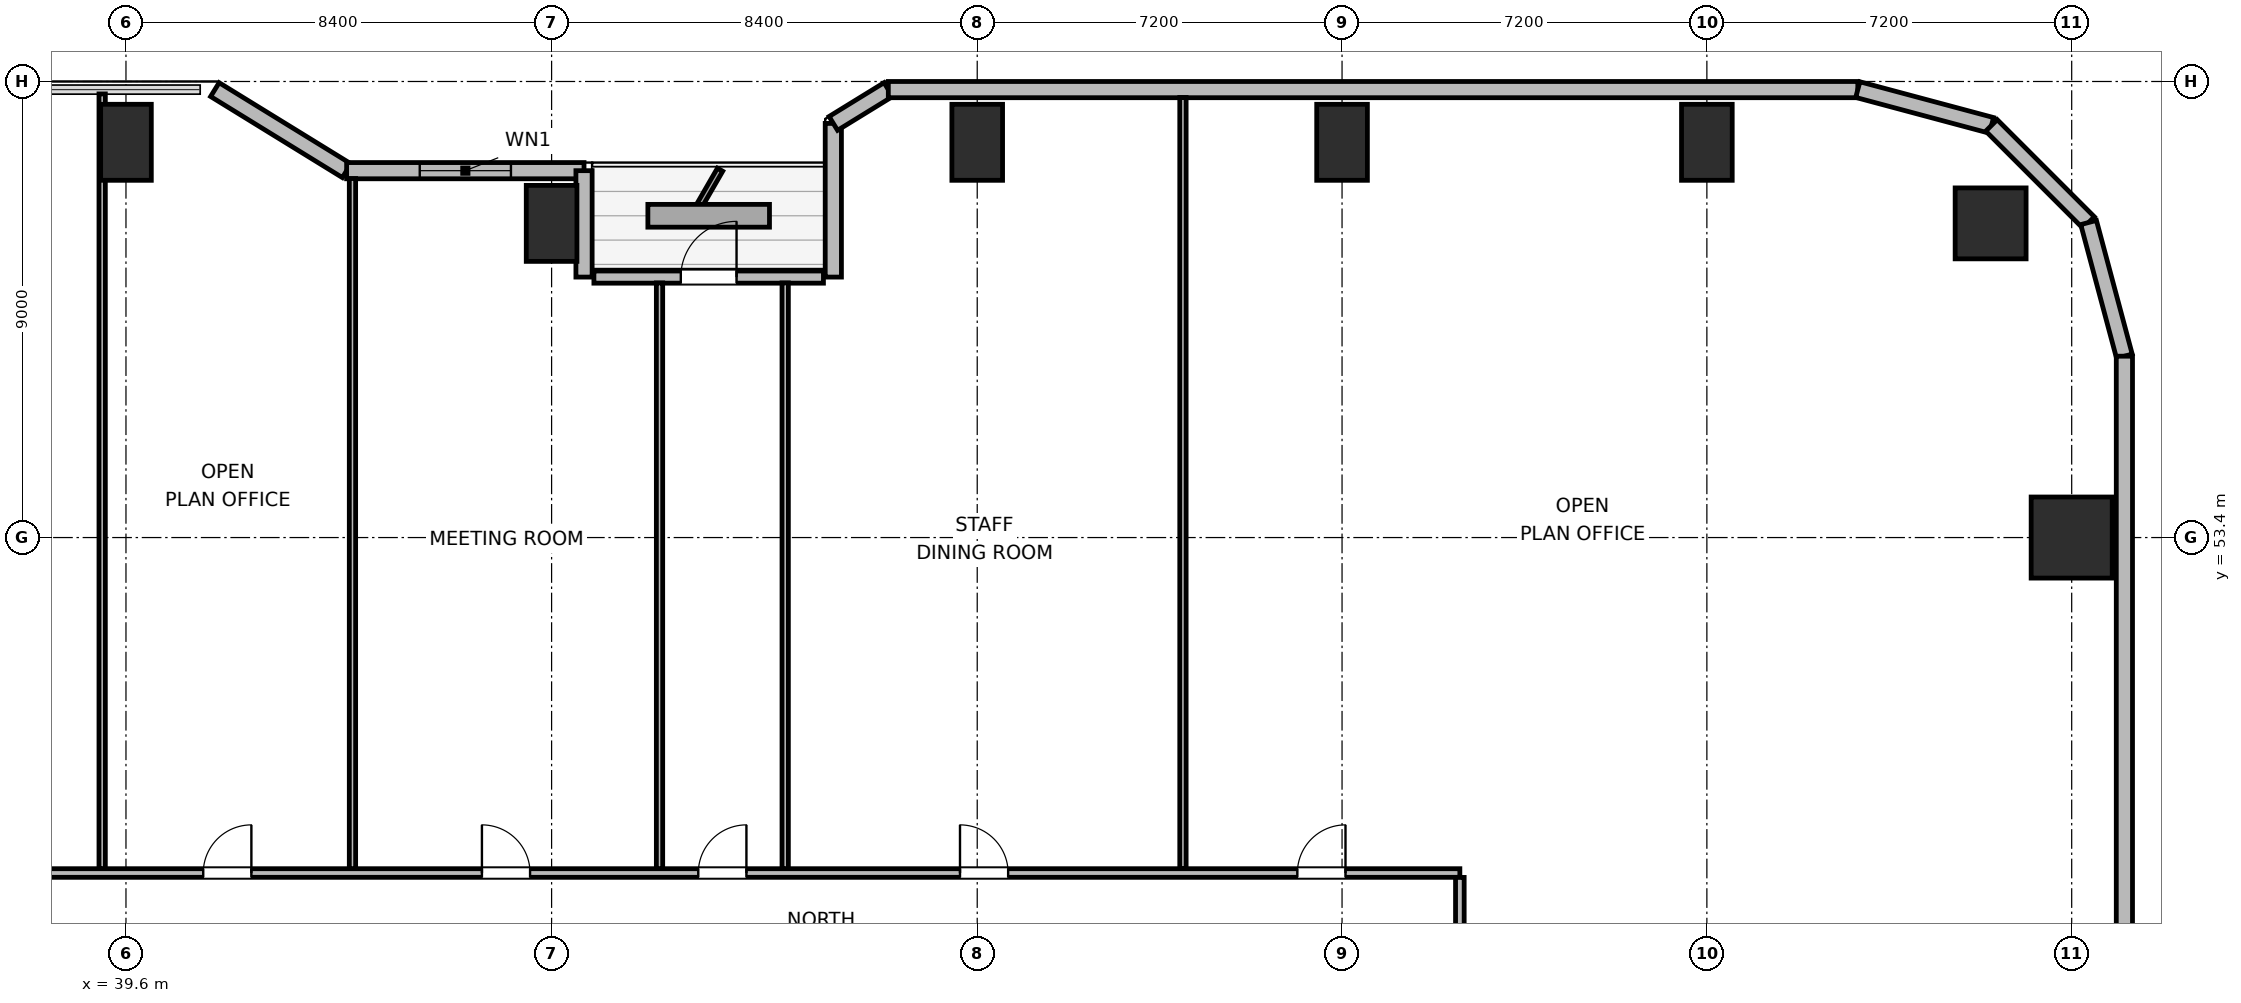
"""IFC4 building model, lengths in metres.
Left out: names, types, materials, properties, quantities, classifications, styles, units other than length and angle.
Written with IfcOpenShell. Run it as: python <this file> out.ifc"""

import sys

from ifc_helpers import new_model, si_unit, direction, frame, frame_2d, origin, origin_2d, place, context, subcontext, project, spatial, rectangle, circle, extrude, element, fill, save


model = new_model("IFC4")
c1 = context("Model", 3, precision=1e-05, world=origin(), true_north=direction((0.0, 1.0)))
c2 = subcontext(c1, "Body", "Model", "MODEL_VIEW")
j1 = project(units=[si_unit("LENGTHUNIT", "METRE"), si_unit("PLANEANGLEUNIT", "RADIAN")], contexts=[c1])
p1 = place(None, origin())
s1 = spatial("IfcSite", under=j1, at=p1, CompositionType="ELEMENT")
p2 = place(p1, origin())
s2 = spatial("IfcBuilding", under=s1, at=p2, CompositionType="ELEMENT")
p3 = place(p2, frame((0.0, 0.0, 41.1)))
s3 = spatial("IfcBuildingStorey", under=s2, at=p3, CompositionType="ELEMENT", Elevation=41.1)
p4 = place(p3, frame((76.4, 59.6, 0.0), z_axis=(0.0, 0.0, 1.0), x_axis=(1.0, 0.0, 0.0)))
e1 = element("IfcColumn", 1, at=p4, inside=s3, PredefinedType="COLUMN", context=c2, shape_type="SweptSolid", body=[
    extrude(circle(Radius=0.7, at=origin_2d()), origin(), (0.0, 0.0, 1.0), 3.9),
])
for number, where, z_axis, x_axis in (
    (2, (39.6, 61.2, 0.0), (0.0, 0.0, 1.0), (1.0, 0.0, 0.0)),
    (3, (48.0, 59.6, 0.0), (0.0, 0.0, 1.0), (1.0, 0.0, 0.0)),
    (4, (56.4, 61.2, 0.0), (0.0, 0.0, 1.0), (1.0, 0.0, 0.0)),
    (5, (63.6, 61.2, 0.0), (0.0, 0.0, 1.0), (1.0, 0.0, 0.0)),
    (6, (70.8, 61.2, 0.0), (0.0, 0.0, 1.0), (1.0, 0.0, 0.0)),
):
    element("IfcColumn", number, at=place(p3, frame(where, z_axis=z_axis, x_axis=x_axis)), inside=s3, PredefinedType="COLUMN", context=c2, shape_type="SweptSolid", body=[
        extrude(rectangle(XDim=1.0, YDim=1.5, at=origin_2d()), origin(), (0.0, 0.0, 1.0), 3.9),
    ])
p5 = place(p3, frame((78.0, 53.4, 0.0), z_axis=(0.0, 0.0, 1.0), x_axis=(1.0, 0.0, 0.0)))
e7 = element("IfcColumn", 7, at=p5, inside=s3, PredefinedType="COLUMN", context=c2, shape_type="SweptSolid", body=[
    extrude(rectangle(XDim=1.6, YDim=1.6, at=origin_2d()), origin(), (0.0, 0.0, 1.0), 3.9),
])
p6 = place(p3, frame((41.355, 62.24, 0.0), z_axis=(0.0, 0.0, 1.0), x_axis=(0.851630857047, -0.524142044989, 0.0)))
e8 = element("IfcWall", 8, at=p6, inside=s3, PredefinedType="SOLIDWALL", context=c2, shape_type="SweptSolid", body=[
    extrude(rectangle(XDim=3.053, YDim=0.32, at=frame_2d((1.526, 0.0))), origin(), (0.0, 0.0, 1.0), 2.875),
])
p7 = place(p3, frame((43.955, 60.64, 0.0), z_axis=(0.0, 0.0, 1.0), x_axis=(1.0, 0.0, 0.0)))
e9 = element("IfcWall", 9, at=p7, inside=s3, PredefinedType="SOLIDWALL", context=c2, shape_type="SweptSolid", body=[
    extrude(rectangle(XDim=4.685, YDim=0.32, at=frame_2d((2.343, 0.0))), origin(), (0.0, 0.0, 1.0), 2.875),
])
p8 = place(p7, frame((1.443, 0.0, 0.85)))
e10 = element("IfcOpeningElement", 10, at=p8, cuts=e9, PredefinedType="OPENING", context=c2, shape_type="SweptSolid", body=[
    extrude(rectangle(XDim=1.8, YDim=1.1, at=frame_2d((0.9, 0.55))), frame((0.0, 0.17, 0.0), z_axis=(0.0, -1.0, 0.0), x_axis=(1.0, 0.0, 0.0)), (0.0, 0.0, 1.0), 0.34),
])
p9 = place(p3, frame((48.64, 60.64, 0.0), z_axis=(0.0, 0.0, 1.0), x_axis=(0.0, -1.0, 0.0)))
e11 = element("IfcWall", 11, at=p9, inside=s3, PredefinedType="SOLIDWALL", context=c2, shape_type="SweptSolid", body=[
    extrude(rectangle(XDim=2.1, YDim=0.32, at=frame_2d((1.05, 0.0))), origin(), (0.0, 0.0, 1.0), 2.875),
])
p10 = place(p3, frame((48.835, 58.54, 0.0), z_axis=(0.0, 0.0, 1.0), x_axis=(1.0, 0.0, 0.0)))
e12 = element("IfcWall", 12, at=p10, inside=s3, PredefinedType="SOLIDWALL", context=c2, shape_type="SweptSolid", body=[
    extrude(rectangle(XDim=4.53, YDim=0.24, at=frame_2d((2.265, 0.0))), origin(), (0.0, 0.0, 1.0), 3.64),
])
p11 = place(p10, frame((1.715, 0.0, 0.0)))
e13 = element("IfcOpeningElement", 13, at=p11, cuts=e12, PredefinedType="OPENING", context=c2, shape_type="SweptSolid", body=[
    extrude(rectangle(XDim=1.1, YDim=2.04, at=frame_2d((0.55, 1.02))), frame((0.0, 0.13, 0.0), z_axis=(0.0, -1.0, 0.0), x_axis=(1.0, 0.0, 0.0)), (0.0, 0.0, 1.0), 0.26),
])
p12 = place(p3, frame((53.56, 58.54, 0.0), z_axis=(0.0, 0.0, 1.0), x_axis=(0.0, 1.0, 0.0)))
e14 = element("IfcWall", 14, at=p12, inside=s3, PredefinedType="SOLIDWALL", context=c2, shape_type="SweptSolid", body=[
    extrude(rectangle(XDim=3.032, YDim=0.32, at=frame_2d((1.516, 0.0))), origin(), (0.0, 0.0, 1.0), 2.875),
])
p13 = place(p3, frame((53.56, 61.573, 0.0), z_axis=(0.0, 0.0, 1.0), x_axis=(0.851776724646, 0.523904964045, 0.0)))
e15 = element("IfcWall", 15, at=p13, inside=s3, PredefinedType="SOLIDWALL", context=c2, shape_type="SweptSolid", body=[
    extrude(rectangle(XDim=1.274, YDim=0.32, at=frame_2d((0.637, 0.0))), origin(), (0.0, 0.0, 1.0), 3.64),
])
p14 = place(p3, frame((54.645, 62.24, 0.0), z_axis=(0.0, 0.0, 1.0), x_axis=(1.0, 0.0, 0.0)))
e16 = element("IfcWall", 16, at=p14, inside=s3, PredefinedType="SOLIDWALL", context=c2, shape_type="SweptSolid", body=[
    extrude(rectangle(XDim=19.134, YDim=0.32, at=frame_2d((9.567, 0.0))), origin(), (0.0, 0.0, 1.0), 3.64),
])
p15 = place(p3, frame((73.779, 62.24, 0.0), z_axis=(0.0, 0.0, 1.0), x_axis=(0.965964405026, -0.25867502435, 0.0)))
e17 = element("IfcWall", 17, at=p15, inside=s3, PredefinedType="SOLIDWALL", context=c2, shape_type="SweptSolid", body=[
    extrude(rectangle(XDim=2.731, YDim=0.32, at=frame_2d((1.366, 0.0))), origin(), (0.0, 0.0, 1.0), 3.64),
])
p16 = place(p3, frame((76.417, 61.533, 0.0), z_axis=(0.0, 0.0, 1.0), x_axis=(0.707106781187, -0.707106781187, 0.0)))
e18 = element("IfcWall", 18, at=p16, inside=s3, PredefinedType="SOLIDWALL", context=c2, shape_type="SweptSolid", body=[
    extrude(rectangle(XDim=2.71, YDim=0.32, at=frame_2d((1.355, 0.0))), origin(), (0.0, 0.0, 1.0), 3.64),
])
p17 = place(p3, frame((78.333, 59.617, 0.0), z_axis=(0.0, 0.0, 1.0), x_axis=(0.25869736047, -0.965958423373, 0.0)))
e19 = element("IfcWall", 19, at=p17, inside=s3, PredefinedType="SOLIDWALL", context=c2, shape_type="SweptSolid", body=[
    extrude(rectangle(XDim=2.731, YDim=0.32, at=frame_2d((1.366, 0.0))), origin(), (0.0, 0.0, 1.0), 3.64),
])
p18 = place(p3, frame((79.04, 56.979, 0.0), z_axis=(0.0, 0.0, 1.0), x_axis=(0.0, -1.0, 0.0)))
e20 = element("IfcWall", 20, at=p18, inside=s3, PredefinedType="SOLIDWALL", context=c2, shape_type="SweptSolid", body=[
    extrude(rectangle(XDim=14.219, YDim=0.32, at=frame_2d((7.109, 0.0))), origin(), (0.0, 0.0, 1.0), 3.64),
])
p19 = place(p3, frame((30.075, 46.78, 0.0), z_axis=(0.0, 0.0, 1.0), x_axis=(1.0, 0.0, 0.0)))
e21 = element("IfcWall", 21, at=p19, inside=s3, PredefinedType="PARTITIONING", context=c2, shape_type="SweptSolid", body=[
    extrude(rectangle(XDim=35.85, YDim=0.17, at=frame_2d((17.925, 0.0))), origin(), (0.0, 0.0, 1.0), 3.64),
])
p20 = place(p19, frame((4.053, 0.0, 0.0)))
e22 = element("IfcOpeningElement", 22, at=p20, cuts=e21, PredefinedType="OPENING", context=c2, shape_type="SweptSolid", body=[
    extrude(rectangle(XDim=0.95, YDim=2.04, at=frame_2d((0.475, 1.02))), frame((0.0, 0.095, 0.0), z_axis=(0.0, -1.0, 0.0), x_axis=(1.0, 0.0, 0.0)), (0.0, 0.0, 1.0), 0.19),
])
p21 = place(p19, frame((11.05, 0.0, 0.0)))
e23 = element("IfcOpeningElement", 23, at=p21, cuts=e21, PredefinedType="OPENING", context=c2, shape_type="SweptSolid", body=[
    extrude(rectangle(XDim=0.95, YDim=2.04, at=frame_2d((0.475, 1.02))), frame((0.0, 0.095, 0.0), z_axis=(0.0, -1.0, 0.0), x_axis=(1.0, 0.0, 0.0)), (0.0, 0.0, 1.0), 0.19),
])
p22 = place(p19, frame((16.55, 0.0, 0.0)))
e24 = element("IfcOpeningElement", 24, at=p22, cuts=e21, PredefinedType="OPENING", context=c2, shape_type="SweptSolid", body=[
    extrude(rectangle(XDim=0.95, YDim=2.04, at=frame_2d((0.475, 1.02))), frame((0.0, 0.095, 0.0), z_axis=(0.0, -1.0, 0.0), x_axis=(1.0, 0.0, 0.0)), (0.0, 0.0, 1.0), 0.19),
])
p23 = place(p19, frame((20.82, 0.0, 0.0)))
e25 = element("IfcOpeningElement", 25, at=p23, cuts=e21, PredefinedType="OPENING", context=c2, shape_type="SweptSolid", body=[
    extrude(rectangle(XDim=0.95, YDim=2.04, at=frame_2d((0.475, 1.02))), frame((0.0, 0.095, 0.0), z_axis=(0.0, -1.0, 0.0), x_axis=(1.0, 0.0, 0.0)), (0.0, 0.0, 1.0), 0.19),
])
p24 = place(p19, frame((25.985, 0.0, 0.0)))
e26 = element("IfcOpeningElement", 26, at=p24, cuts=e21, PredefinedType="OPENING", context=c2, shape_type="SweptSolid", body=[
    extrude(rectangle(XDim=0.95, YDim=2.04, at=frame_2d((0.475, 1.02))), frame((0.0, 0.095, 0.0), z_axis=(0.0, -1.0, 0.0), x_axis=(1.0, 0.0, 0.0)), (0.0, 0.0, 1.0), 0.19),
])
p25 = place(p19, frame((32.643, 0.0, 0.0)))
e27 = element("IfcOpeningElement", 27, at=p25, cuts=e21, PredefinedType="OPENING", context=c2, shape_type="SweptSolid", body=[
    extrude(rectangle(XDim=0.95, YDim=2.04, at=frame_2d((0.475, 1.02))), frame((0.0, 0.095, 0.0), z_axis=(0.0, -1.0, 0.0), x_axis=(1.0, 0.0, 0.0)), (0.0, 0.0, 1.0), 0.19),
])
p26 = place(p3, frame((65.925, 25.307, 0.0), z_axis=(0.0, 0.0, 1.0), x_axis=(0.0, 1.0, 0.0)))
e28 = element("IfcWall", 28, at=p26, inside=s3, PredefinedType="PARTITIONING", context=c2, shape_type="SweptSolid", body=[
    extrude(rectangle(XDim=21.386, YDim=0.17, at=frame_2d((10.693, 0.0))), origin(), (0.0, 0.0, 1.0), 3.64),
])
p27 = place(p26, frame((5.428, 0.0, 0.0)))
e29 = element("IfcOpeningElement", 29, at=p27, cuts=e28, PredefinedType="OPENING", context=c2, shape_type="SweptSolid", body=[
    extrude(rectangle(XDim=0.95, YDim=2.04, at=frame_2d((0.475, 1.02))), frame((0.0, 0.095, 0.0), z_axis=(0.0, -1.0, 0.0), x_axis=(1.0, 0.0, 0.0)), (0.0, 0.0, 1.0), 0.19),
])
p28 = place(p26, frame((16.208, 0.0, 0.0)))
e30 = element("IfcOpeningElement", 30, at=p28, cuts=e28, PredefinedType="OPENING", context=c2, shape_type="SweptSolid", body=[
    extrude(rectangle(XDim=0.95, YDim=2.04, at=frame_2d((0.475, 1.02))), frame((0.0, 0.095, 0.0), z_axis=(0.0, -1.0, 0.0), x_axis=(1.0, 0.0, 0.0)), (0.0, 0.0, 1.0), 0.19),
])
p29 = place(p3, frame((39.13, 46.867, 0.0), z_axis=(0.0, 0.0, 1.0), x_axis=(0.0, 1.0, 0.0)))
e31 = element("IfcWall", 31, at=p29, inside=s3, PredefinedType="PARTITIONING", context=c2, shape_type="SweptSolid", body=[
    extrude(rectangle(XDim=15.288, YDim=0.125, at=frame_2d((7.644, 0.0))), origin(), (0.0, 0.0, 1.0), 3.64),
])
p30 = place(p3, frame((44.07, 46.867, 0.0), z_axis=(0.0, 0.0, 1.0), x_axis=(0.0, 1.0, 0.0)))
e32 = element("IfcWall", 32, at=p30, inside=s3, PredefinedType="PARTITIONING", context=c2, shape_type="SweptSolid", body=[
    extrude(rectangle(XDim=13.618, YDim=0.125, at=frame_2d((6.809, 0.0))), origin(), (0.0, 0.0, 1.0), 3.003),
])
p31 = place(p3, frame((50.13, 46.867, 0.0), z_axis=(0.0, 0.0, 1.0), x_axis=(0.0, 1.0, 0.0)))
e33 = element("IfcWall", 33, at=p31, inside=s3, PredefinedType="PARTITIONING", context=c2, shape_type="SweptSolid", body=[
    extrude(rectangle(XDim=11.558, YDim=0.125, at=frame_2d((5.779, 0.0))), origin(), (0.0, 0.0, 1.0), 3.64),
])
p32 = place(p3, frame((52.61, 46.867, 0.0), z_axis=(0.0, 0.0, 1.0), x_axis=(0.0, 1.0, 0.0)))
e34 = element("IfcWall", 34, at=p32, inside=s3, PredefinedType="PARTITIONING", context=c2, shape_type="SweptSolid", body=[
    extrude(rectangle(XDim=11.558, YDim=0.125, at=frame_2d((5.779, 0.0))), origin(), (0.0, 0.0, 1.0), 3.003),
])
p33 = place(p3, frame((60.46, 46.867, 0.0), z_axis=(0.0, 0.0, 1.0), x_axis=(0.0, 1.0, 0.0)))
e35 = element("IfcWall", 35, at=p33, inside=s3, PredefinedType="PARTITIONING", context=c2, shape_type="SweptSolid", body=[
    extrude(rectangle(XDim=15.218, YDim=0.125, at=frame_2d((7.609, 0.0))), origin(), (0.0, 0.0, 1.0), 3.64),
])
p34 = place(p8, origin())
e36 = element("IfcWindow", 36, at=p34, inside=s3, PartitioningType="SINGLE_PANEL", PredefinedType="WINDOW", context=c2, shape_type="SweptSolid", body=[
    extrude(rectangle(XDim=1.8, YDim=1.1, at=frame_2d((0.9, 0.55))), frame((0.0, 0.03, 0.0), z_axis=(0.0, -1.0, 0.0), x_axis=(1.0, 0.0, 0.0)), (0.0, 0.0, 1.0), 0.06),
])
fill(e10, e36)
p35 = place(p11, origin())
e37 = element("IfcDoor", 37, at=p35, inside=s3, OperationType="SINGLE_SWING_RIGHT", PredefinedType="DOOR", context=c2, shape_type="SweptSolid", body=[
    extrude(rectangle(XDim=1.1, YDim=2.04, at=frame_2d((0.55, 1.02))), frame((0.0, 0.025, 0.0), z_axis=(0.0, -1.0, 0.0), x_axis=(1.0, 0.0, 0.0)), (0.0, 0.0, 1.0), 0.05),
])
fill(e13, e37)
p36 = place(p21, origin())
e38 = element("IfcDoor", 38, at=p36, inside=s3, OperationType="SINGLE_SWING_RIGHT", PredefinedType="DOOR", context=c2, shape_type="SweptSolid", body=[
    extrude(rectangle(XDim=0.95, YDim=2.04, at=frame_2d((0.475, 1.02))), frame((0.0, 0.025, 0.0), z_axis=(0.0, -1.0, 0.0), x_axis=(1.0, 0.0, 0.0)), (0.0, 0.0, 1.0), 0.05),
])
fill(e23, e38)
p37 = place(p22, origin())
e39 = element("IfcDoor", 39, at=p37, inside=s3, OperationType="SINGLE_SWING_LEFT", PredefinedType="DOOR", context=c2, shape_type="SweptSolid", body=[
    extrude(rectangle(XDim=0.95, YDim=2.04, at=frame_2d((0.475, 1.02))), frame((0.0, 0.025, 0.0), z_axis=(0.0, -1.0, 0.0), x_axis=(1.0, 0.0, 0.0)), (0.0, 0.0, 1.0), 0.05),
])
fill(e24, e39)
p38 = place(p23, origin())
e40 = element("IfcDoor", 40, at=p38, inside=s3, OperationType="SINGLE_SWING_RIGHT", PredefinedType="DOOR", context=c2, shape_type="SweptSolid", body=[
    extrude(rectangle(XDim=0.95, YDim=2.04, at=frame_2d((0.475, 1.02))), frame((0.0, 0.025, 0.0), z_axis=(0.0, -1.0, 0.0), x_axis=(1.0, 0.0, 0.0)), (0.0, 0.0, 1.0), 0.05),
])
fill(e25, e40)
p39 = place(p24, origin())
e41 = element("IfcDoor", 41, at=p39, inside=s3, OperationType="SINGLE_SWING_LEFT", PredefinedType="DOOR", context=c2, shape_type="SweptSolid", body=[
    extrude(rectangle(XDim=0.95, YDim=2.04, at=frame_2d((0.475, 1.02))), frame((0.0, 0.025, 0.0), z_axis=(0.0, -1.0, 0.0), x_axis=(1.0, 0.0, 0.0)), (0.0, 0.0, 1.0), 0.05),
])
fill(e26, e41)
p40 = place(p25, origin())
e42 = element("IfcDoor", 42, at=p40, inside=s3, OperationType="SINGLE_SWING_RIGHT", PredefinedType="DOOR", context=c2, shape_type="SweptSolid", body=[
    extrude(rectangle(XDim=0.95, YDim=2.04, at=frame_2d((0.475, 1.02))), frame((0.0, 0.025, 0.0), z_axis=(0.0, -1.0, 0.0), x_axis=(1.0, 0.0, 0.0)), (0.0, 0.0, 1.0), 0.05),
])
fill(e27, e42)
save(model, sys.argv[1])
